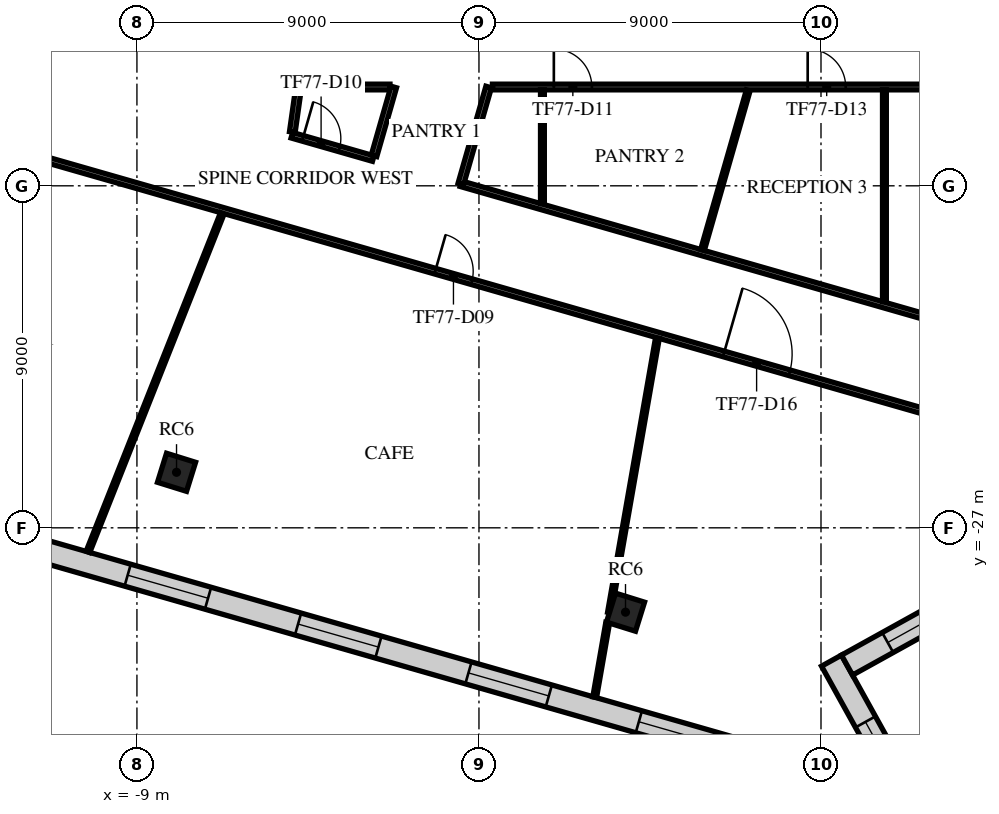
"""IFC4 building model, lengths in metres.
Left out: names, types, materials, properties, quantities, classifications, styles, units other than length and angle.
Written with IfcOpenShell. Run it as: python <this file> out.ifc"""

import sys

from ifc_helpers import new_model, si_unit, direction, frame, frame_2d, origin, origin_2d, place, context, subcontext, project, spatial, rectangle, extrude, element, fill, save


model = new_model("IFC4")
c1 = context("Model", 3, precision=1e-05, world=origin(), true_north=direction((0.0, 1.0)))
c2 = subcontext(c1, "Body", "Model", "MODEL_VIEW")
j1 = project(units=[si_unit("LENGTHUNIT", "METRE"), si_unit("PLANEANGLEUNIT", "RADIAN")], contexts=[c1])
p1 = place(None, origin())
s1 = spatial("IfcSite", under=j1, at=p1, CompositionType="ELEMENT")
p2 = place(p1, origin())
s2 = spatial("IfcBuilding", under=s1, at=p2, CompositionType="ELEMENT")
p3 = place(p2, frame((0.0, 0.0, 324.5)))
s3 = spatial("IfcBuildingStorey", under=s2, at=p3, CompositionType="ELEMENT", Elevation=324.5)
for number, where, z_axis, x_axis in (
    (1, (-7.958, -25.539, 0.0), (0.0, 0.0, 1.0), (0.298, 0.955, 0.0)),
    (2, (3.856, -29.22, 0.0), (0.0, 0.0, 1.0), (0.298, 0.955, 0.0)),
):
    element("IfcColumn", number, at=place(p3, frame(where, z_axis=z_axis, x_axis=x_axis)), inside=s3, PredefinedType="COLUMN", context=c2, shape_type="SweptSolid", body=[
        extrude(rectangle(XDim=0.8, YDim=0.8, at=origin_2d()), origin(), (0.0, 0.0, 1.0), 4.0),
    ])
p4 = place(p3, frame((-28.363, -22.764, 0.0), z_axis=(0.0, 0.0, 1.0), x_axis=(0.961261250735, -0.275638908422, 0.0)))
e3 = element("IfcWall", 3, at=p4, inside=s3, PredefinedType="STANDARD", context=c2, shape_type="SweptSolid", body=[
    extrude(rectangle(XDim=41.979, YDim=0.6, at=frame_2d((20.99, 0.0))), origin(), (0.0, 0.0, 1.0), 3.65),
])
p5 = place(p4, frame((1.232, 0.0, 0.9)))
e4 = element("IfcOpeningElement", 4, at=p5, cuts=e3, PredefinedType="OPENING", context=c2, shape_type="SweptSolid", body=[
    extrude(rectangle(XDim=2.2, YDim=2.1, at=frame_2d((1.1, 1.05))), frame((0.0, 0.31, 0.0), z_axis=(0.0, -1.0, 0.0), x_axis=(1.0, 0.0, 0.0)), (0.0, 0.0, 1.0), 0.62),
])
p6 = place(p4, frame((5.896, 0.0, 0.9)))
e5 = element("IfcOpeningElement", 5, at=p6, cuts=e3, PredefinedType="OPENING", context=c2, shape_type="SweptSolid", body=[
    extrude(rectangle(XDim=2.2, YDim=2.1, at=frame_2d((1.1, 1.05))), frame((0.0, 0.31, 0.0), z_axis=(0.0, -1.0, 0.0), x_axis=(1.0, 0.0, 0.0)), (0.0, 0.0, 1.0), 0.62),
])
p7 = place(p4, frame((10.561, 0.0, 0.9)))
e6 = element("IfcOpeningElement", 6, at=p7, cuts=e3, PredefinedType="OPENING", context=c2, shape_type="SweptSolid", body=[
    extrude(rectangle(XDim=2.2, YDim=2.1, at=frame_2d((1.1, 1.05))), frame((0.0, 0.31, 0.0), z_axis=(0.0, -1.0, 0.0), x_axis=(1.0, 0.0, 0.0)), (0.0, 0.0, 1.0), 0.62),
])
p8 = place(p4, frame((15.225, 0.0, 0.9)))
e7 = element("IfcOpeningElement", 7, at=p8, cuts=e3, PredefinedType="OPENING", context=c2, shape_type="SweptSolid", body=[
    extrude(rectangle(XDim=2.2, YDim=2.1, at=frame_2d((1.1, 1.05))), frame((0.0, 0.31, 0.0), z_axis=(0.0, -1.0, 0.0), x_axis=(1.0, 0.0, 0.0)), (0.0, 0.0, 1.0), 0.62),
])
p9 = place(p4, frame((19.89, 0.0, 0.9)))
e8 = element("IfcOpeningElement", 8, at=p9, cuts=e3, PredefinedType="OPENING", context=c2, shape_type="SweptSolid", body=[
    extrude(rectangle(XDim=2.2, YDim=2.1, at=frame_2d((1.1, 1.05))), frame((0.0, 0.31, 0.0), z_axis=(0.0, -1.0, 0.0), x_axis=(1.0, 0.0, 0.0)), (0.0, 0.0, 1.0), 0.62),
])
p10 = place(p4, frame((24.554, 0.0, 0.9)))
e9 = element("IfcOpeningElement", 9, at=p10, cuts=e3, PredefinedType="OPENING", context=c2, shape_type="SweptSolid", body=[
    extrude(rectangle(XDim=2.2, YDim=2.1, at=frame_2d((1.1, 1.05))), frame((0.0, 0.31, 0.0), z_axis=(0.0, -1.0, 0.0), x_axis=(1.0, 0.0, 0.0)), (0.0, 0.0, 1.0), 0.62),
])
p11 = place(p4, frame((29.218, 0.0, 0.9)))
e10 = element("IfcOpeningElement", 10, at=p11, cuts=e3, PredefinedType="OPENING", context=c2, shape_type="SweptSolid", body=[
    extrude(rectangle(XDim=2.2, YDim=2.1, at=frame_2d((1.1, 1.05))), frame((0.0, 0.31, 0.0), z_axis=(0.0, -1.0, 0.0), x_axis=(1.0, 0.0, 0.0)), (0.0, 0.0, 1.0), 0.62),
])
p12 = place(p4, frame((33.883, 0.0, 0.9)))
e11 = element("IfcOpeningElement", 11, at=p12, cuts=e3, PredefinedType="OPENING", context=c2, shape_type="SweptSolid", body=[
    extrude(rectangle(XDim=2.2, YDim=2.1, at=frame_2d((1.1, 1.05))), frame((0.0, 0.31, 0.0), z_axis=(0.0, -1.0, 0.0), x_axis=(1.0, 0.0, 0.0)), (0.0, 0.0, 1.0), 0.62),
])
p13 = place(p4, frame((38.547, 0.0, 0.9)))
e12 = element("IfcOpeningElement", 12, at=p13, cuts=e3, PredefinedType="OPENING", context=c2, shape_type="SweptSolid", body=[
    extrude(rectangle(XDim=2.2, YDim=2.1, at=frame_2d((1.1, 1.05))), frame((0.0, 0.31, 0.0), z_axis=(0.0, -1.0, 0.0), x_axis=(1.0, 0.0, 0.0)), (0.0, 0.0, 1.0), 0.62),
])
p14 = place(p3, frame((11.645, -34.769, 0.0), z_axis=(0.0, 0.0, 1.0), x_axis=(-0.48482808285, 0.874609472896, 0.0)))
e13 = element("IfcWall", 13, at=p14, inside=s3, PredefinedType="STANDARD", context=c2, shape_type="SweptSolid", body=[
    extrude(rectangle(XDim=4.885, YDim=0.6, at=frame_2d((2.443, 0.0))), origin(), (0.0, 0.0, 1.0), 3.65),
])
p15 = place(p14, frame((1.243, 0.0, 0.9)))
e14 = element("IfcOpeningElement", 14, at=p15, cuts=e13, PredefinedType="OPENING", context=c2, shape_type="SweptSolid", body=[
    extrude(rectangle(XDim=1.8, YDim=2.1, at=frame_2d((0.9, 1.05))), frame((0.0, 0.31, 0.0), z_axis=(0.0, -1.0, 0.0), x_axis=(1.0, 0.0, 0.0)), (0.0, 0.0, 1.0), 0.62),
])
p16 = place(p3, frame((9.684, -30.613, 0.0), z_axis=(0.0, 0.0, 1.0), x_axis=(0.874616182644, 0.48481597855, 0.0)))
e15 = element("IfcWall", 15, at=p16, inside=s3, PredefinedType="STANDARD", context=c2, shape_type="SweptSolid", body=[
    extrude(rectangle(XDim=8.5, YDim=0.6, at=frame_2d((4.25, 0.0))), origin(), (0.0, 0.0, 1.0), 3.65),
])
p17 = place(p16, frame((1.225, 0.0, 0.9)))
e16 = element("IfcOpeningElement", 16, at=p17, cuts=e15, PredefinedType="OPENING", context=c2, shape_type="SweptSolid", body=[
    extrude(rectangle(XDim=1.8, YDim=2.1, at=frame_2d((0.9, 1.05))), frame((0.0, 0.31, 0.0), z_axis=(0.0, -1.0, 0.0), x_axis=(1.0, 0.0, 0.0)), (0.0, 0.0, 1.0), 0.62),
])
p18 = place(p16, frame((5.475, 0.0, 0.9)))
e17 = element("IfcOpeningElement", 17, at=p18, cuts=e15, PredefinedType="OPENING", context=c2, shape_type="SweptSolid", body=[
    extrude(rectangle(XDim=1.8, YDim=2.1, at=frame_2d((0.9, 1.05))), frame((0.0, 0.31, 0.0), z_axis=(0.0, -1.0, 0.0), x_axis=(1.0, 0.0, 0.0)), (0.0, 0.0, 1.0), 0.62),
])
p19 = place(p3, frame((-24.007, -13.694, 0.0), z_axis=(0.0, 0.0, 1.0), x_axis=(0.961264140923, -0.275628828998, 0.0)))
e18 = element("IfcWall", 18, at=p19, inside=s3, PredefinedType="PARTITIONING", context=c2, shape_type="SweptSolid", body=[
    extrude(rectangle(XDim=38.68, YDim=0.15, at=frame_2d((19.34, 0.0))), origin(), (0.0, 0.0, 1.0), 3.25),
])
p20 = place(p19, frame((0.3, 0.0, 0.0)))
e19 = element("IfcOpeningElement", 19, at=p20, cuts=e18, PredefinedType="OPENING", context=c2, shape_type="SweptSolid", body=[
    extrude(rectangle(XDim=1.8, YDim=2.1, at=frame_2d((0.9, 1.05))), frame((0.0, 0.085, 0.0), z_axis=(0.0, -1.0, 0.0), x_axis=(1.0, 0.0, 0.0)), (0.0, 0.0, 1.0), 0.17),
])
p21 = place(p19, frame((5.55, 0.0, 0.0)))
e20 = element("IfcOpeningElement", 20, at=p21, cuts=e18, PredefinedType="OPENING", context=c2, shape_type="SweptSolid", body=[
    extrude(rectangle(XDim=1.0, YDim=2.1, at=frame_2d((0.5, 1.05))), frame((0.0, 0.085, 0.0), z_axis=(0.0, -1.0, 0.0), x_axis=(1.0, 0.0, 0.0)), (0.0, 0.0, 1.0), 0.17),
])
p22 = place(p19, frame((10.125, 0.0, 0.0)))
e21 = element("IfcOpeningElement", 21, at=p22, cuts=e18, PredefinedType="OPENING", context=c2, shape_type="SweptSolid", body=[
    extrude(rectangle(XDim=1.0, YDim=2.1, at=frame_2d((0.5, 1.05))), frame((0.0, 0.085, 0.0), z_axis=(0.0, -1.0, 0.0), x_axis=(1.0, 0.0, 0.0)), (0.0, 0.0, 1.0), 0.17),
])
p23 = place(p19, frame((23.776, 0.0, 0.0)))
e22 = element("IfcOpeningElement", 22, at=p23, cuts=e18, PredefinedType="OPENING", context=c2, shape_type="SweptSolid", body=[
    extrude(rectangle(XDim=1.0, YDim=2.1, at=frame_2d((0.5, 1.05))), frame((0.0, 0.085, 0.0), z_axis=(0.0, -1.0, 0.0), x_axis=(1.0, 0.0, 0.0)), (0.0, 0.0, 1.0), 0.17),
])
p24 = place(p19, frame((31.675, 0.0, 0.0)))
e23 = element("IfcOpeningElement", 23, at=p24, cuts=e18, PredefinedType="OPENING", context=c2, shape_type="SweptSolid", body=[
    extrude(rectangle(XDim=1.8, YDim=2.1, at=frame_2d((0.9, 1.05))), frame((0.0, 0.085, 0.0), z_axis=(0.0, -1.0, 0.0), x_axis=(1.0, 0.0, 0.0)), (0.0, 0.0, 1.0), 0.17),
])
p25 = place(p3, frame((-4.923, -16.669, 0.0), z_axis=(0.0, 0.0, 1.0), x_axis=(0.961254639508, -0.275661963325, 0.0)))
e24 = element("IfcWall", 24, at=p25, inside=s3, PredefinedType="PARTITIONING", context=c2, shape_type="SweptSolid", body=[
    extrude(rectangle(XDim=2.227, YDim=0.15, at=frame_2d((1.114, 0.0))), origin(), (0.0, 0.0, 1.0), 3.65),
])
p26 = place(p25, frame((0.3, 0.0, 0.0)))
e25 = element("IfcOpeningElement", 25, at=p26, cuts=e24, PredefinedType="OPENING", context=c2, shape_type="SweptSolid", body=[
    extrude(rectangle(XDim=1.0, YDim=2.1, at=frame_2d((0.5, 1.05))), frame((0.0, 0.085, 0.0), z_axis=(0.0, -1.0, 0.0), x_axis=(1.0, 0.0, 0.0)), (0.0, 0.0, 1.0), 0.17),
])
p27 = place(p3, frame((-4.911, -16.583, 0.0), z_axis=(0.0, 0.0, 1.0), x_axis=(0.139705462727, 0.99019310424, 0.0)))
e26 = element("IfcWall", 26, at=p27, inside=s3, PredefinedType="PARTITIONING", context=c2, shape_type="SweptSolid", body=[
    extrude(rectangle(XDim=1.195, YDim=0.15, at=frame_2d((0.598, 0.0))), origin(), (0.0, 0.0, 1.0), 3.65),
])
p28 = place(p3, frame((-4.658, -15.4, 0.0), z_axis=(0.0, 0.0, 1.0), x_axis=(1.0, 0.0, 0.0)))
e27 = element("IfcWall", 27, at=p28, inside=s3, PredefinedType="PARTITIONING", context=c2, shape_type="SweptSolid", body=[
    extrude(rectangle(XDim=2.316, YDim=0.15, at=frame_2d((1.158, 0.0))), origin(), (0.0, 0.0, 1.0), 3.25),
])
p29 = place(p3, frame((-2.761, -17.211, 0.0), z_axis=(0.0, 0.0, 1.0), x_axis=(0.275628103307, 0.961264349005, 0.0)))
e28 = element("IfcWall", 28, at=p29, inside=s3, PredefinedType="PARTITIONING", context=c2, shape_type="SweptSolid", body=[
    extrude(rectangle(XDim=1.884, YDim=0.15, at=frame_2d((0.942, 0.0))), origin(), (0.0, 0.0, 1.0), 3.25),
])
p30 = place(p3, frame((-0.475, -17.945, 0.0), z_axis=(0.0, 0.0, 1.0), x_axis=(0.9612723016, -0.275600366793, 0.0)))
e29 = element("IfcWall", 29, at=p30, inside=s3, PredefinedType="PARTITIONING", context=c2, shape_type="SweptSolid", body=[
    extrude(rectangle(XDim=14.888, YDim=0.15, at=frame_2d((7.444, 0.0))), origin(), (0.0, 0.0, 1.0), 3.25),
])
p31 = place(p3, frame((-0.475, -17.944, 0.0), z_axis=(0.0, 0.0, 1.0), x_axis=(0.275793011759, 0.961217048676, 0.0)))
e30 = element("IfcWall", 30, at=p31, inside=s3, PredefinedType="PARTITIONING", context=c2, shape_type="SweptSolid", body=[
    extrude(rectangle(XDim=2.647, YDim=0.15, at=frame_2d((1.323, 0.0))), origin(), (0.0, 0.0, 1.0), 3.65),
])
p32 = place(p3, frame((0.354, -15.4, 0.0), z_axis=(0.0, 0.0, 1.0), x_axis=(1.0, 0.0, 0.0)))
e31 = element("IfcWall", 31, at=p32, inside=s3, PredefinedType="PARTITIONING", context=c2, shape_type="SweptSolid", body=[
    extrude(rectangle(XDim=15.045, YDim=0.15, at=frame_2d((7.523, 0.0))), origin(), (0.0, 0.0, 1.0), 3.25),
])
p33 = place(p32, frame((1.616, 0.0, 0.0)))
e32 = element("IfcOpeningElement", 32, at=p33, cuts=e31, PredefinedType="OPENING", context=c2, shape_type="SweptSolid", body=[
    extrude(rectangle(XDim=1.0, YDim=2.1, at=frame_2d((0.5, 1.05))), frame((0.0, 0.085, 0.0), z_axis=(0.0, -1.0, 0.0), x_axis=(1.0, 0.0, 0.0)), (0.0, 0.0, 1.0), 0.17),
])
p34 = place(p32, frame((8.295, 0.0, 0.0)))
e33 = element("IfcOpeningElement", 33, at=p34, cuts=e31, PredefinedType="OPENING", context=c2, shape_type="SweptSolid", body=[
    extrude(rectangle(XDim=1.0, YDim=2.1, at=frame_2d((0.5, 1.05))), frame((0.0, 0.085, 0.0), z_axis=(0.0, -1.0, 0.0), x_axis=(1.0, 0.0, 0.0)), (0.0, 0.0, 1.0), 0.17),
])
p35 = place(p3, frame((-10.289, -27.633, 0.0), z_axis=(0.0, 0.0, 1.0), x_axis=(0.368868227501, 0.929481700057, 0.0)))
e34 = element("IfcWall", 34, at=p35, inside=s3, PredefinedType="PARTITIONING", context=c2, shape_type="SweptSolid", body=[
    extrude(rectangle(XDim=9.584, YDim=0.1, at=frame_2d((4.792, 0.0))), origin(), (0.0, 0.0, 1.0), 3.05),
])
p36 = place(p3, frame((1.67, -18.467, 0.0), z_axis=(0.0, 0.0, 1.0), x_axis=(0.0, 1.0, 0.0)))
e35 = element("IfcWall", 35, at=p36, inside=s3, PredefinedType="PARTITIONING", context=c2, shape_type="SweptSolid", body=[
    extrude(rectangle(XDim=2.992, YDim=0.1, at=frame_2d((1.496, 0.0))), origin(), (0.0, 0.0, 1.0), 3.65),
])
p37 = place(p3, frame((3.045, -31.456, 0.0), z_axis=(0.0, 0.0, 1.0), x_axis=(0.172163344144, 0.985068415357, 0.0)))
e36 = element("IfcWall", 36, at=p37, inside=s3, PredefinedType="PARTITIONING", context=c2, shape_type="SweptSolid", body=[
    extrude(rectangle(XDim=1.992, YDim=0.1, at=frame_2d((0.996, 0.0))), origin(), (0.0, 0.0, 1.0), 3.65),
])
p38 = place(p3, frame((3.434, -29.229, 0.0), z_axis=(0.0, 0.0, 1.0), x_axis=(0.172116960566, 0.985076520827, 0.0)))
e37 = element("IfcWall", 37, at=p38, inside=s3, PredefinedType="PARTITIONING", context=c2, shape_type="SweptSolid", body=[
    extrude(rectangle(XDim=7.331, YDim=0.1, at=frame_2d((3.665, 0.0))), origin(), (0.0, 0.0, 1.0), 3.05),
])
p39 = place(p3, frame((5.882, -19.689, 0.0), z_axis=(0.0, 0.0, 1.0), x_axis=(0.275577071069, 0.961278980266, 0.0)))
e38 = element("IfcWall", 38, at=p39, inside=s3, PredefinedType="PARTITIONING", context=c2, shape_type="SweptSolid", body=[
    extrude(rectangle(XDim=4.369, YDim=0.1, at=frame_2d((2.185, 0.0))), origin(), (0.0, 0.0, 1.0), 3.65),
])
p40 = place(p3, frame((10.669, -21.048, 0.0), z_axis=(0.0, 0.0, 1.0), x_axis=(0.0, 1.0, 0.0)))
e39 = element("IfcWall", 39, at=p40, inside=s3, PredefinedType="PARTITIONING", context=c2, shape_type="SweptSolid", body=[
    extrude(rectangle(XDim=5.573, YDim=0.1, at=frame_2d((2.786, 0.0))), origin(), (0.0, 0.0, 1.0), 3.65),
])
p41 = place(p9, origin())
e40 = element("IfcWindow", 40, at=p41, inside=s3, PartitioningType="SINGLE_PANEL", PredefinedType="WINDOW", context=c2, shape_type="SweptSolid", body=[
    extrude(rectangle(XDim=2.2, YDim=2.1, at=frame_2d((1.1, 1.05))), frame((0.0, 0.03, 0.0), z_axis=(0.0, -1.0, 0.0), x_axis=(1.0, 0.0, 0.0)), (0.0, 0.0, 1.0), 0.06),
])
fill(e8, e40)
p42 = place(p10, origin())
e41 = element("IfcWindow", 41, at=p42, inside=s3, PartitioningType="SINGLE_PANEL", PredefinedType="WINDOW", context=c2, shape_type="SweptSolid", body=[
    extrude(rectangle(XDim=2.2, YDim=2.1, at=frame_2d((1.1, 1.05))), frame((0.0, 0.03, 0.0), z_axis=(0.0, -1.0, 0.0), x_axis=(1.0, 0.0, 0.0)), (0.0, 0.0, 1.0), 0.06),
])
fill(e9, e41)
p43 = place(p11, origin())
e42 = element("IfcWindow", 42, at=p43, inside=s3, PartitioningType="SINGLE_PANEL", PredefinedType="WINDOW", context=c2, shape_type="SweptSolid", body=[
    extrude(rectangle(XDim=2.2, YDim=2.1, at=frame_2d((1.1, 1.05))), frame((0.0, 0.03, 0.0), z_axis=(0.0, -1.0, 0.0), x_axis=(1.0, 0.0, 0.0)), (0.0, 0.0, 1.0), 0.06),
])
fill(e10, e42)
p44 = place(p12, origin())
e43 = element("IfcWindow", 43, at=p44, inside=s3, PartitioningType="SINGLE_PANEL", PredefinedType="WINDOW", context=c2, shape_type="SweptSolid", body=[
    extrude(rectangle(XDim=2.2, YDim=2.1, at=frame_2d((1.1, 1.05))), frame((0.0, 0.03, 0.0), z_axis=(0.0, -1.0, 0.0), x_axis=(1.0, 0.0, 0.0)), (0.0, 0.0, 1.0), 0.06),
])
fill(e11, e43)
p45 = place(p15, origin())
e44 = element("IfcWindow", 44, at=p45, inside=s3, PartitioningType="SINGLE_PANEL", PredefinedType="WINDOW", context=c2, shape_type="SweptSolid", body=[
    extrude(rectangle(XDim=1.8, YDim=2.1, at=frame_2d((0.9, 1.05))), frame((0.0, 0.03, 0.0), z_axis=(0.0, -1.0, 0.0), x_axis=(1.0, 0.0, 0.0)), (0.0, 0.0, 1.0), 0.06),
])
fill(e14, e44)
p46 = place(p17, origin())
e45 = element("IfcWindow", 45, at=p46, inside=s3, PartitioningType="SINGLE_PANEL", PredefinedType="WINDOW", context=c2, shape_type="SweptSolid", body=[
    extrude(rectangle(XDim=1.8, YDim=2.1, at=frame_2d((0.9, 1.05))), frame((0.0, 0.03, 0.0), z_axis=(0.0, -1.0, 0.0), x_axis=(1.0, 0.0, 0.0)), (0.0, 0.0, 1.0), 0.06),
])
fill(e16, e45)
p47 = place(p23, frame((1.0, 0.0, 0.0), z_axis=(0.0, 0.0, 1.0), x_axis=(-1.0, 0.0, 0.0)))
e46 = element("IfcDoor", 46, at=p47, inside=s3, OperationType="SINGLE_SWING_RIGHT", PredefinedType="DOOR", context=c2, shape_type="SweptSolid", body=[
    extrude(rectangle(XDim=1.0, YDim=2.1, at=frame_2d((0.5, 1.05))), frame((0.0, 0.025, 0.0), z_axis=(0.0, -1.0, 0.0), x_axis=(1.0, 0.0, 0.0)), (0.0, 0.0, 1.0), 0.05),
])
fill(e22, e46)
p48 = place(p26, origin())
e47 = element("IfcDoor", 47, at=p48, inside=s3, OperationType="SINGLE_SWING_RIGHT", PredefinedType="DOOR", context=c2, shape_type="SweptSolid", body=[
    extrude(rectangle(XDim=1.0, YDim=2.1, at=frame_2d((0.5, 1.05))), frame((0.0, 0.025, 0.0), z_axis=(0.0, -1.0, 0.0), x_axis=(1.0, 0.0, 0.0)), (0.0, 0.0, 1.0), 0.05),
])
fill(e25, e47)
p49 = place(p33, frame((1.0, 0.0, 0.0), z_axis=(0.0, 0.0, 1.0), x_axis=(-1.0, 0.0, 0.0)))
e48 = element("IfcDoor", 48, at=p49, inside=s3, OperationType="SINGLE_SWING_RIGHT", PredefinedType="DOOR", context=c2, shape_type="SweptSolid", body=[
    extrude(rectangle(XDim=1.0, YDim=2.1, at=frame_2d((0.5, 1.05))), frame((0.0, 0.025, 0.0), z_axis=(0.0, -1.0, 0.0), x_axis=(1.0, 0.0, 0.0)), (0.0, 0.0, 1.0), 0.05),
])
fill(e32, e48)
p50 = place(p34, frame((1.0, 0.0, 0.0), z_axis=(0.0, 0.0, 1.0), x_axis=(-1.0, 0.0, 0.0)))
e49 = element("IfcDoor", 49, at=p50, inside=s3, OperationType="SINGLE_SWING_RIGHT", PredefinedType="DOOR", context=c2, shape_type="SweptSolid", body=[
    extrude(rectangle(XDim=1.0, YDim=2.1, at=frame_2d((0.5, 1.05))), frame((0.0, 0.025, 0.0), z_axis=(0.0, -1.0, 0.0), x_axis=(1.0, 0.0, 0.0)), (0.0, 0.0, 1.0), 0.05),
])
fill(e33, e49)
p51 = place(p24, frame((1.8, 0.0, 0.0), z_axis=(0.0, 0.0, 1.0), x_axis=(-1.0, 0.0, 0.0)))
e50 = element("IfcDoor", 50, at=p51, inside=s3, OperationType="DOUBLE_DOOR_SINGLE_SWING", PredefinedType="DOOR", context=c2, shape_type="SweptSolid", body=[
    extrude(rectangle(XDim=1.8, YDim=2.1, at=frame_2d((0.9, 1.05))), frame((0.0, 0.025, 0.0), z_axis=(0.0, -1.0, 0.0), x_axis=(1.0, 0.0, 0.0)), (0.0, 0.0, 1.0), 0.05),
])
fill(e23, e50)
save(model, sys.argv[1])
